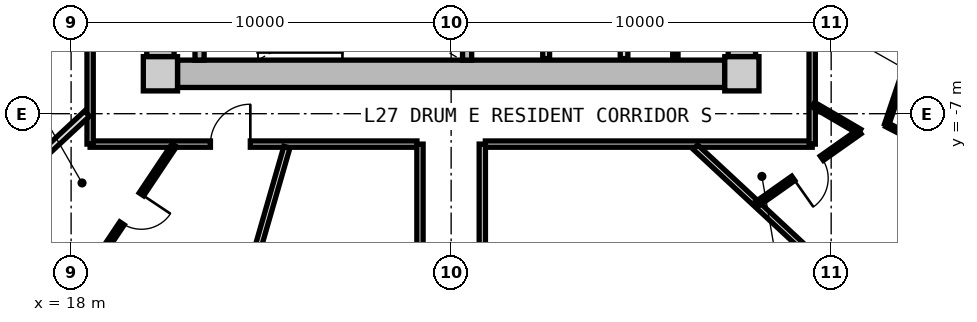
"""IFC4 building model, lengths in metres.
Left out: names, types, materials, properties, quantities, classifications, styles, units other than length and angle.
Written with IfcOpenShell. Run it as: python <this file> out.ifc"""

import sys

from ifc_helpers import new_model, si_unit, direction, frame, frame_2d, origin, origin_2d, place, context, subcontext, project, spatial, rectangle, extrude, source, transform, mapped, element, fill, save


model = new_model("IFC4")
c1 = context("Model", 3, precision=1e-05, world=origin(), true_north=direction((0.0, 1.0)))
c2 = subcontext(c1, "Body", "Model", "MODEL_VIEW")
j1 = project(units=[si_unit("LENGTHUNIT", "METRE"), si_unit("PLANEANGLEUNIT", "RADIAN")], contexts=[c1])
p1 = place(None, origin())
s1 = spatial("IfcSite", under=j1, at=p1, CompositionType="ELEMENT")
p2 = place(p1, origin())
s2 = spatial("IfcBuilding", under=s1, at=p2, CompositionType="ELEMENT")
p3 = place(p2, frame((0.0, 0.0, 90.15)))
s3 = spatial("IfcBuildingStorey", under=s2, at=p3, CompositionType="ELEMENT", Elevation=90.15)
m1 = source(origin(), c2, "Body", "SweptSolid", [
    extrude(rectangle(XDim=0.9, YDim=0.9, at=origin_2d()), origin(), (0.0, 0.0, 1.0), 3.05),
])
for number, where, z_axis, x_axis in (
    (1, (20.35, -5.95, 0.0), (0.0, 0.0, 1.0), (1.0, 0.0, 0.0)),
    (2, (35.65, -5.95, 0.0), (0.0, 0.0, 1.0), (1.0, 0.0, 0.0)),
):
    element("IfcColumn", number, at=place(p3, frame(where, z_axis=z_axis, x_axis=x_axis)), inside=s3, PredefinedType="COLUMN", context=c2, shape_type="MappedRepresentation", body=[
        mapped(m1, transform((0.0, 0.0, 0.0), x_axis=(1.0, 0.0, 0.0), y_axis=(0.0, 1.0, 0.0), z_axis=(0.0, 0.0, 1.0), scale=1.0)),
    ])
m2 = source(origin(), c2, "Body", "SweptSolid", [
    extrude(rectangle(XDim=14.4, YDim=0.72, at=frame_2d((7.2, 0.0))), origin(), (0.0, 0.0, 1.0), 2.79),
])
p4 = place(p3, frame((35.2, -5.95, 0.0), z_axis=(0.0, 0.0, 1.0), x_axis=(-1.0, 0.0, 0.0)))
e3 = element("IfcWall", 3, at=p4, inside=s3, PredefinedType="SHEAR", context=c2, shape_type="MappedRepresentation", body=[
    mapped(m2, transform((0.0, 0.0, 0.0), x_axis=(1.0, 0.0, 0.0), y_axis=(0.0, 1.0, 0.0), z_axis=(0.0, 0.0, 1.0), scale=1.0)),
])
m3 = source(origin(), c2, "Body", "SweptSolid", [
    extrude(rectangle(XDim=11.0, YDim=0.72, at=frame_2d((5.5, 0.0))), origin(), (0.0, 0.0, 1.0), 2.79),
])
p5 = place(p3, frame((20.35, -5.5, 0.0), z_axis=(0.0, 0.0, 1.0), x_axis=(0.0, 1.0, 0.0)))
e4 = element("IfcWall", 4, at=p5, inside=s3, PredefinedType="SHEAR", context=c2, shape_type="MappedRepresentation", body=[
    mapped(m3, transform((0.0, 0.0, 0.0), x_axis=(1.0, 0.0, 0.0), y_axis=(0.0, 1.0, 0.0), z_axis=(0.0, 0.0, 1.0), scale=1.0)),
])
p6 = place(p5, frame((3.8, 0.0, 0.0)))
e5 = element("IfcOpeningElement", 5, at=p6, cuts=e4, PredefinedType="OPENING", context=c2, shape_type="SweptSolid", body=[
    extrude(rectangle(XDim=1.2, YDim=2.15, at=frame_2d((0.6, 1.075))), frame((0.0, 0.37, 0.0), z_axis=(0.0, -1.0, 0.0), x_axis=(1.0, 0.0, 0.0)), (0.0, 0.0, 1.0), 0.74),
])
p7 = place(p3, frame((35.65, 5.5, 0.0), z_axis=(0.0, 0.0, 1.0), x_axis=(0.0, -1.0, 0.0)))
e6 = element("IfcWall", 6, at=p7, inside=s3, PredefinedType="SHEAR", context=c2, shape_type="MappedRepresentation", body=[
    mapped(m3, transform((0.0, 0.0, 0.0), x_axis=(1.0, 0.0, 0.0), y_axis=(0.0, 1.0, 0.0), z_axis=(0.0, 0.0, 1.0), scale=1.0)),
])
p8 = place(p7, frame((5.65, 0.0, 0.0)))
e7 = element("IfcOpeningElement", 7, at=p8, cuts=e6, PredefinedType="OPENING", context=c2, shape_type="SweptSolid", body=[
    extrude(rectangle(XDim=1.2, YDim=2.15, at=frame_2d((0.6, 1.075))), frame((0.0, 0.37, 0.0), z_axis=(0.0, -1.0, 0.0), x_axis=(1.0, 0.0, 0.0)), (0.0, 0.0, 1.0), 0.74),
])
m4 = source(origin(), c2, "Body", "SweptSolid", [
    extrude(rectangle(XDim=3.14, YDim=0.24, at=frame_2d((1.57, 0.0))), origin(), (0.0, 0.0, 1.0), 2.79),
])
for number, where, z_axis, x_axis in (
    (8, (21.38, -5.59, 0.0), (0.0, 0.0, 1.0), (0.0, 1.0, 0.0)),
    (9, (28.42, -5.59, 0.0), (0.0, 0.0, 1.0), (0.0, 1.0, 0.0)),
):
    element("IfcWall", number, at=place(p3, frame(where, z_axis=z_axis, x_axis=x_axis)), inside=s3, PredefinedType="PARTITIONING", context=c2, shape_type="MappedRepresentation", body=[
        mapped(m4, transform((0.0, 0.0, 0.0), x_axis=(1.0, 0.0, 0.0), y_axis=(0.0, 1.0, 0.0), z_axis=(0.0, 0.0, 1.0), scale=1.0)),
    ])
m5 = source(origin(), c2, "Body", "SweptSolid", [
    extrude(rectangle(XDim=3.8, YDim=0.2, at=frame_2d((1.9, 0.0))), origin(), (0.0, 0.0, 1.0), 2.775),
])
p9 = place(p3, frame((32.55, -5.55, 0.0), z_axis=(0.0, 0.0, 1.0), x_axis=(0.0, 1.0, 0.0)))
e10 = element("IfcWall", 10, at=p9, inside=s3, PredefinedType="PARTITIONING", context=c2, shape_type="MappedRepresentation", body=[
    mapped(m5, transform((0.0, 0.0, 0.0), x_axis=(1.0, 0.0, 0.0), y_axis=(0.0, 1.0, 0.0), z_axis=(0.0, 0.0, 1.0), scale=1.0)),
])
m6 = source(origin(), c2, "Body", "SweptSolid", [
    extrude(rectangle(XDim=3.22, YDim=0.18, at=frame_2d((1.61, 0.0))), origin(), (0.0, 0.0, 1.0), 2.775),
])
p10 = place(p3, frame((30.5, -5.55, 0.0), z_axis=(0.0, 0.0, 1.0), x_axis=(0.0, 1.0, 0.0)))
e11 = element("IfcWall", 11, at=p10, inside=s3, PredefinedType="PARTITIONING", context=c2, shape_type="MappedRepresentation", body=[
    mapped(m6, transform((0.0, 0.0, 0.0), x_axis=(1.0, 0.0, 0.0), y_axis=(0.0, 1.0, 0.0), z_axis=(0.0, 0.0, 1.0), scale=1.0)),
])
m7 = source(origin(), c2, "Body", "SweptSolid", [
    extrude(rectangle(XDim=3.8, YDim=0.14, at=frame_2d((1.9, 0.0))), origin(), (0.0, 0.0, 1.0), 2.775),
])
p11 = place(p3, frame((33.9, -5.55, 0.0), z_axis=(0.0, 0.0, 1.0), x_axis=(0.0, 1.0, 0.0)))
e12 = element("IfcWall", 12, at=p11, inside=s3, PredefinedType="PARTITIONING", context=c2, shape_type="MappedRepresentation", body=[
    mapped(m7, transform((0.0, 0.0, 0.0), x_axis=(1.0, 0.0, 0.0), y_axis=(0.0, 1.0, 0.0), z_axis=(0.0, 0.0, 1.0), scale=1.0)),
])
m8 = source(origin(), c2, "Body", "SweptSolid", [
    extrude(rectangle(XDim=8.6, YDim=0.165, at=frame_2d((4.3, 0.0))), origin(), (0.0, 0.0, 1.0), 2.775),
])
p12 = place(p3, frame((37.5, -7.8, 0.0), z_axis=(0.0, 0.0, 1.0), x_axis=(-1.0, 0.0, 0.0)))
e13 = element("IfcWall", 13, at=p12, inside=s3, PredefinedType="PARTITIONING", context=c2, shape_type="MappedRepresentation", body=[
    mapped(m8, transform((0.0, 0.0, 0.0), x_axis=(1.0, 0.0, 0.0), y_axis=(0.0, 1.0, 0.0), z_axis=(0.0, 0.0, 1.0), scale=1.0)),
])
p13 = place(p3, frame((27.1, -7.8, 0.0), z_axis=(0.0, 0.0, 1.0), x_axis=(-1.0, 0.0, 0.0)))
e14 = element("IfcWall", 14, at=p13, inside=s3, PredefinedType="PARTITIONING", context=c2, shape_type="MappedRepresentation", body=[
    mapped(m8, transform((0.0, 0.0, 0.0), x_axis=(1.0, 0.0, 0.0), y_axis=(0.0, 1.0, 0.0), z_axis=(0.0, 0.0, 1.0), scale=1.0)),
])
p14 = place(p13, frame((4.384, 0.0, 0.0)))
e15 = element("IfcOpeningElement", 15, at=p14, cuts=e14, PredefinedType="OPENING", context=c2, shape_type="SweptSolid", body=[
    extrude(rectangle(XDim=1.05, YDim=2.15, at=frame_2d((0.525, 1.075))), frame((0.0, 0.093, 0.0), z_axis=(0.0, -1.0, 0.0), x_axis=(1.0, 0.0, 0.0)), (0.0, 0.0, 1.0), 0.185),
])
m9 = source(origin(), c2, "Body", "SweptSolid", [
    extrude(rectangle(XDim=15.6, YDim=0.165, at=frame_2d((7.8, 0.0))), origin(), (0.0, 0.0, 1.0), 2.775),
])
p15 = place(p3, frame((18.5, -7.8, 0.0), z_axis=(0.0, 0.0, 1.0), x_axis=(0.0, 1.0, 0.0)))
e16 = element("IfcWall", 16, at=p15, inside=s3, PredefinedType="PARTITIONING", context=c2, shape_type="MappedRepresentation", body=[
    mapped(m9, transform((0.0, 0.0, 0.0), x_axis=(1.0, 0.0, 0.0), y_axis=(0.0, 1.0, 0.0), z_axis=(0.0, 0.0, 1.0), scale=1.0)),
])
p16 = place(p15, frame((7.134, 0.0, 0.0)))
e17 = element("IfcOpeningElement", 17, at=p16, cuts=e16, PredefinedType="OPENING", context=c2, shape_type="SweptSolid", body=[
    extrude(rectangle(XDim=1.25, YDim=2.2, at=frame_2d((0.625, 1.1))), frame((0.0, 0.093, 0.0), z_axis=(0.0, -1.0, 0.0), x_axis=(1.0, 0.0, 0.0)), (0.0, 0.0, 1.0), 0.185),
])
p17 = place(p3, frame((37.5, 7.8, 0.0), z_axis=(0.0, 0.0, 1.0), x_axis=(0.0, -1.0, 0.0)))
e18 = element("IfcWall", 18, at=p17, inside=s3, PredefinedType="PARTITIONING", context=c2, shape_type="MappedRepresentation", body=[
    mapped(m9, transform((0.0, 0.0, 0.0), x_axis=(1.0, 0.0, 0.0), y_axis=(0.0, 1.0, 0.0), z_axis=(0.0, 0.0, 1.0), scale=1.0)),
])
p18 = place(p17, frame((9.177, 0.0, 0.0)))
e19 = element("IfcOpeningElement", 19, at=p18, cuts=e18, PredefinedType="OPENING", context=c2, shape_type="SweptSolid", body=[
    extrude(rectangle(XDim=1.05, YDim=2.15, at=frame_2d((0.525, 1.075))), frame((0.0, 0.093, 0.0), z_axis=(0.0, -1.0, 0.0), x_axis=(1.0, 0.0, 0.0)), (0.0, 0.0, 1.0), 0.185),
])
m10 = source(origin(), c2, "Body", "SweptSolid", [
    extrude(rectangle(XDim=8.989, YDim=0.165, at=frame_2d((4.495, 0.0))), origin(), (0.0, 0.0, 1.0), 2.275),
])
p19 = place(p3, frame((23.678, -7.88, 0.0), z_axis=(0.0, 0.0, 1.0), x_axis=(-0.27702323008, -0.960863221274, 0.0)))
e20 = element("IfcWall", 20, at=p19, inside=s3, PredefinedType="PARTITIONING", context=c2, shape_type="MappedRepresentation", body=[
    mapped(m10, transform((0.0, 0.0, 0.0), x_axis=(1.0, 0.0, 0.0), y_axis=(0.0, 1.0, 0.0), z_axis=(0.0, 0.0, 1.0), scale=1.0)),
])
m11 = source(origin(), c2, "Body", "SweptSolid", [
    extrude(rectangle(XDim=6.187, YDim=0.165, at=frame_2d((3.093, 0.0))), origin(), (0.0, 0.0, 1.0), 2.275),
])
p20 = place(p3, frame((34.429, -7.88, 0.0), z_axis=(0.0, 0.0, 1.0), x_axis=(0.732501077882, -0.680765870841, 0.0)))
e21 = element("IfcWall", 21, at=p20, inside=s3, PredefinedType="PARTITIONING", context=c2, shape_type="MappedRepresentation", body=[
    mapped(m11, transform((0.0, 0.0, 0.0), x_axis=(1.0, 0.0, 0.0), y_axis=(0.0, 1.0, 0.0), z_axis=(0.0, 0.0, 1.0), scale=1.0)),
])
m12 = source(origin(), c2, "Body", "SweptSolid", [
    extrude(rectangle(XDim=7.56, YDim=0.165, at=frame_2d((3.78, 0.0))), origin(), (0.0, 0.0, 1.0), 2.775),
])
p21 = place(p3, frame((27.18, -15.36, 0.0), z_axis=(0.0, 0.0, 1.0), x_axis=(0.0, 1.0, 0.0)))
e22 = element("IfcWall", 22, at=p21, inside=s3, PredefinedType="PARTITIONING", context=c2, shape_type="MappedRepresentation", body=[
    mapped(m12, transform((0.0, 0.0, 0.0), x_axis=(1.0, 0.0, 0.0), y_axis=(0.0, 1.0, 0.0), z_axis=(0.0, 0.0, 1.0), scale=1.0)),
])
p22 = place(p21, frame((3.255, 0.0, 0.0)))
e23 = element("IfcOpeningElement", 23, at=p22, cuts=e22, PredefinedType="OPENING", context=c2, shape_type="SweptSolid", body=[
    extrude(rectangle(XDim=1.05, YDim=2.15, at=frame_2d((0.525, 1.075))), frame((0.0, 0.093, 0.0), z_axis=(0.0, -1.0, 0.0), x_axis=(1.0, 0.0, 0.0)), (0.0, 0.0, 1.0), 0.185),
])
p23 = place(p3, frame((28.82, -15.36, 0.0), z_axis=(0.0, 0.0, 1.0), x_axis=(0.0, 1.0, 0.0)))
e24 = element("IfcWall", 24, at=p23, inside=s3, PredefinedType="PARTITIONING", context=c2, shape_type="MappedRepresentation", body=[
    mapped(m12, transform((0.0, 0.0, 0.0), x_axis=(1.0, 0.0, 0.0), y_axis=(0.0, 1.0, 0.0), z_axis=(0.0, 0.0, 1.0), scale=1.0)),
])
p24 = place(p23, frame((3.255, 0.0, 0.0)))
e25 = element("IfcOpeningElement", 25, at=p24, cuts=e24, PredefinedType="OPENING", context=c2, shape_type="SweptSolid", body=[
    extrude(rectangle(XDim=1.05, YDim=2.15, at=frame_2d((0.525, 1.075))), frame((0.0, 0.093, 0.0), z_axis=(0.0, -1.0, 0.0), x_axis=(1.0, 0.0, 0.0)), (0.0, 0.0, 1.0), 0.185),
])
m13 = source(origin(), c2, "Body", "SweptSolid", [
    extrude(rectangle(XDim=7.482, YDim=0.19, at=frame_2d((3.741, 0.0))), origin(), (0.0, 0.0, 1.0), 2.275),
])
p25 = place(p3, frame((18.42, -6.998, 0.0), z_axis=(0.0, 0.0, 1.0), x_axis=(-0.732508698043, -0.680757671489, 0.0)))
e26 = element("IfcWall", 26, at=p25, inside=s3, PredefinedType="PARTITIONING", context=c2, shape_type="MappedRepresentation", body=[
    mapped(m13, transform((0.0, 0.0, 0.0), x_axis=(1.0, 0.0, 0.0), y_axis=(0.0, 1.0, 0.0), z_axis=(0.0, 0.0, 1.0), scale=1.0)),
])
m14 = source(origin(), c2, "Body", "SweptSolid", [
    extrude(rectangle(XDim=4.027, YDim=0.14, at=frame_2d((2.014, 0.0))), origin(), (0.0, 0.0, 1.0), 2.775),
])
p26 = place(p3, frame((20.714, -7.83, 0.0), z_axis=(0.0, 0.0, 1.0), x_axis=(-0.555832825922, -0.831294093343, 0.0)))
e27 = element("IfcWall", 27, at=p26, inside=s3, PredefinedType="PARTITIONING", context=c2, shape_type="MappedRepresentation", body=[
    mapped(m14, transform((0.0, 0.0, 0.0), x_axis=(1.0, 0.0, 0.0), y_axis=(0.0, 1.0, 0.0), z_axis=(0.0, 0.0, 1.0), scale=1.0)),
])
p27 = place(p26, frame((1.554, 0.0, 0.0)))
e28 = element("IfcOpeningElement", 28, at=p27, cuts=e27, PredefinedType="OPENING", context=c2, shape_type="SweptSolid", body=[
    extrude(rectangle(XDim=0.92, YDim=2.1, at=frame_2d((0.46, 1.05))), frame((0.0, 0.08, 0.0), z_axis=(0.0, -1.0, 0.0), x_axis=(1.0, 0.0, 0.0)), (0.0, 0.0, 1.0), 0.16),
])
m15 = source(origin(), c2, "Body", "SweptSolid", [
    extrude(rectangle(XDim=3.291, YDim=0.14, at=frame_2d((1.646, 0.0))), origin(), (0.0, 0.0, 1.0), 2.775),
])
p28 = place(p3, frame((18.476, -11.178, 0.0), z_axis=(0.0, 0.0, 1.0), x_axis=(-0.902381393443, 0.430938302739, 0.0)))
e29 = element("IfcWall", 29, at=p28, inside=s3, PredefinedType="PARTITIONING", context=c2, shape_type="MappedRepresentation", body=[
    mapped(m15, transform((0.0, 0.0, 0.0), x_axis=(1.0, 0.0, 0.0), y_axis=(0.0, 1.0, 0.0), z_axis=(0.0, 0.0, 1.0), scale=1.0)),
])
m16 = source(origin(), c2, "Body", "SweptSolid", [
    extrude(rectangle(XDim=1.407, YDim=0.14, at=frame_2d((0.704, 0.0))), origin(), (0.0, 0.0, 1.0), 2.775),
])
p29 = place(p3, frame((37.53, -6.762, 0.0), z_axis=(0.0, 0.0, 1.0), x_axis=(0.863539718977, -0.504280828258, 0.0)))
e30 = element("IfcWall", 30, at=p29, inside=s3, PredefinedType="PARTITIONING", context=c2, shape_type="MappedRepresentation", body=[
    mapped(m16, transform((0.0, 0.0, 0.0), x_axis=(1.0, 0.0, 0.0), y_axis=(0.0, 1.0, 0.0), z_axis=(0.0, 0.0, 1.0), scale=1.0)),
])
m17 = source(origin(), c2, "Body", "SweptSolid", [
    extrude(rectangle(XDim=3.347, YDim=0.14, at=frame_2d((1.673, 0.0))), origin(), (0.0, 0.0, 1.0), 2.775),
])
p30 = place(p3, frame((38.745, -7.472, 0.0), z_axis=(0.0, 0.0, 1.0), x_axis=(-0.81705680263, -0.576557179537, 0.0)))
e31 = element("IfcWall", 31, at=p30, inside=s3, PredefinedType="PARTITIONING", context=c2, shape_type="MappedRepresentation", body=[
    mapped(m17, transform((0.0, 0.0, 0.0), x_axis=(1.0, 0.0, 0.0), y_axis=(0.0, 1.0, 0.0), z_axis=(0.0, 0.0, 1.0), scale=1.0)),
])
p31 = place(p30, frame((1.214, 0.0, 0.0)))
e32 = element("IfcOpeningElement", 32, at=p31, cuts=e31, PredefinedType="OPENING", context=c2, shape_type="SweptSolid", body=[
    extrude(rectangle(XDim=0.92, YDim=2.1, at=frame_2d((0.46, 1.05))), frame((0.0, 0.08, 0.0), z_axis=(0.0, -1.0, 0.0), x_axis=(1.0, 0.0, 0.0)), (0.0, 0.0, 1.0), 0.16),
])
m18 = source(origin(), c2, "Body", "SweptSolid", [
    extrude(rectangle(XDim=2.117, YDim=0.115, at=frame_2d((1.059, 0.0))), origin(), (0.0, 0.0, 1.0), 2.775),
])
p32 = place(p3, frame((39.46, -7.289, 0.0), z_axis=(0.0, 0.0, 1.0), x_axis=(0.888941834945, -0.45802010227, 0.0)))
e33 = element("IfcWall", 33, at=p32, inside=s3, PredefinedType="PARTITIONING", context=c2, shape_type="MappedRepresentation", body=[
    mapped(m18, transform((0.0, 0.0, 0.0), x_axis=(1.0, 0.0, 0.0), y_axis=(0.0, 1.0, 0.0), z_axis=(0.0, 0.0, 1.0), scale=1.0)),
])
m19 = source(origin(), c2, "Body", "SweptSolid", [
    extrude(rectangle(XDim=3.801, YDim=0.115, at=frame_2d((1.901, 0.0))), origin(), (0.0, 0.0, 1.0), 2.775),
])
p33 = place(p3, frame((39.46, -7.289, 0.0), z_axis=(0.0, 0.0, 1.0), x_axis=(0.320097904666, 0.947384468644, 0.0)))
e34 = element("IfcWall", 34, at=p33, inside=s3, PredefinedType="PARTITIONING", context=c2, shape_type="MappedRepresentation", body=[
    mapped(m19, transform((0.0, 0.0, 0.0), x_axis=(1.0, 0.0, 0.0), y_axis=(0.0, 1.0, 0.0), z_axis=(0.0, 0.0, 1.0), scale=1.0)),
])
p34 = place(p33, frame((1.426, 0.0, 0.0)))
e35 = element("IfcOpeningElement", 35, at=p34, cuts=e34, PredefinedType="OPENING", context=c2, shape_type="SweptSolid", body=[
    extrude(rectangle(XDim=0.95, YDim=2.1, at=frame_2d((0.475, 1.05))), frame((0.0, 0.067, 0.0), z_axis=(0.0, -1.0, 0.0), x_axis=(1.0, 0.0, 0.0)), (0.0, 0.0, 1.0), 0.135),
])
m20 = source(origin(), c2, "Body", "SweptSolid", [
    extrude(rectangle(XDim=1.05, YDim=2.15, at=frame_2d((0.525, 1.075))), frame((0.0, 0.025, 0.0), z_axis=(0.0, -1.0, 0.0), x_axis=(1.0, 0.0, 0.0)), (0.0, 0.0, 1.0), 0.05),
])
p35 = place(p14, frame((1.05, 0.0, 0.0), z_axis=(0.0, 0.0, 1.0), x_axis=(-1.0, 0.0, 0.0)))
e36 = element("IfcDoor", 36, at=p35, inside=s3, OperationType="SINGLE_SWING_RIGHT", PredefinedType="DOOR", context=c2, shape_type="MappedRepresentation", body=[
    mapped(m20, transform((0.0, 0.0, 0.0), x_axis=(1.0, 0.0, 0.0), y_axis=(0.0, 1.0, 0.0), z_axis=(0.0, 0.0, 1.0), scale=1.0)),
])
fill(e15, e36)
m21 = source(origin(), c2, "Body", "SweptSolid", [
    extrude(rectangle(XDim=0.92, YDim=2.1, at=frame_2d((0.46, 1.05))), frame((0.0, 0.025, 0.0), z_axis=(0.0, -1.0, 0.0), x_axis=(1.0, 0.0, 0.0)), (0.0, 0.0, 1.0), 0.05),
])
p36 = place(p27, origin())
e37 = element("IfcDoor", 37, at=p36, inside=s3, OperationType="SINGLE_SWING_LEFT", PredefinedType="DOOR", context=c2, shape_type="MappedRepresentation", body=[
    mapped(m21, transform((0.0, 0.0, 0.0), x_axis=(1.0, 0.0, 0.0), y_axis=(0.0, 1.0, 0.0), z_axis=(0.0, 0.0, 1.0), scale=1.0)),
])
fill(e28, e37)
p37 = place(p31, origin())
e38 = element("IfcDoor", 38, at=p37, inside=s3, OperationType="SINGLE_SWING_RIGHT", PredefinedType="DOOR", context=c2, shape_type="MappedRepresentation", body=[
    mapped(m21, transform((0.0, 0.0, 0.0), x_axis=(1.0, 0.0, 0.0), y_axis=(0.0, 1.0, 0.0), z_axis=(0.0, 0.0, 1.0), scale=1.0)),
])
fill(e32, e38)
save(model, sys.argv[1])
